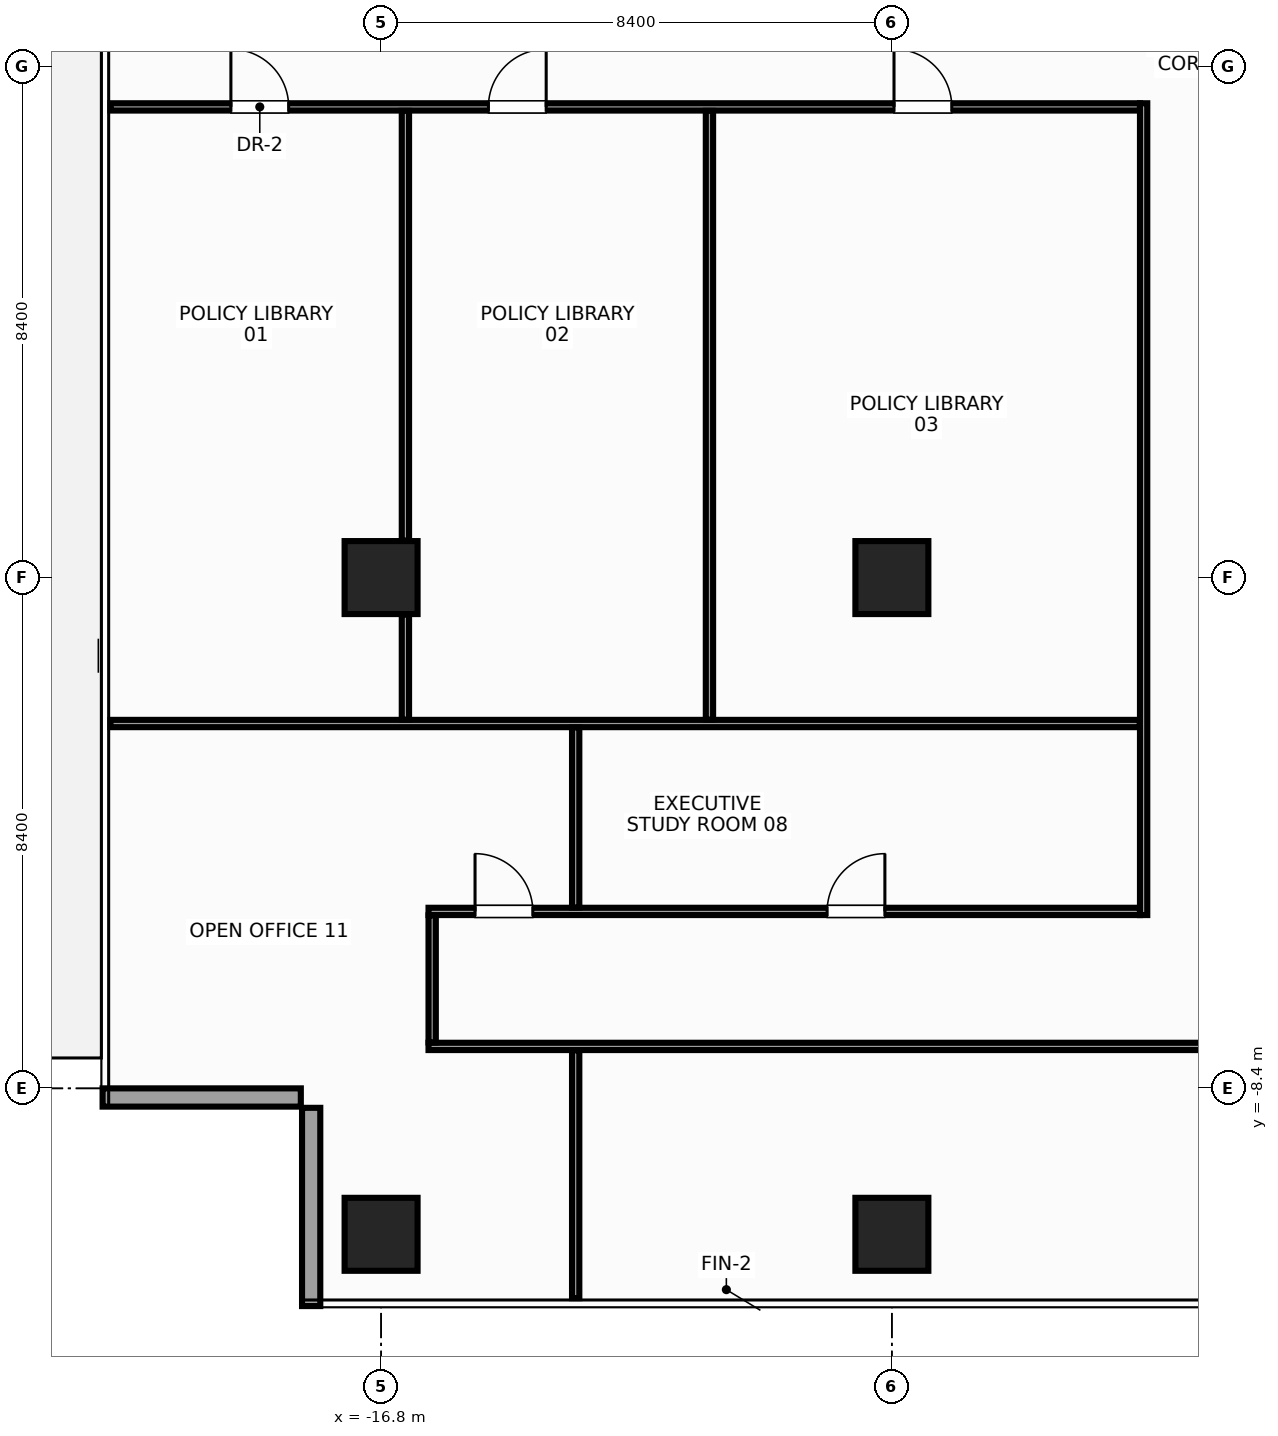
"""IFC4 building model, lengths in metres.
Left out: names, types, materials, properties, quantities, classifications, styles, units other than length and angle.
Written with IfcOpenShell. Run it as: python <this file> out.ifc"""

import sys

from ifc_helpers import new_model, si_unit, direction, frame, frame_2d, origin, origin_2d, place, context, subcontext, project, spatial, rectangle, extrude, source, transform, mapped, element, fill, save


model = new_model("IFC4")
c1 = context("Model", 3, precision=1e-05, world=origin(), true_north=direction((0.0, 1.0)))
c2 = subcontext(c1, "Body", "Model", "MODEL_VIEW")
j1 = project(units=[si_unit("LENGTHUNIT", "METRE"), si_unit("PLANEANGLEUNIT", "RADIAN")], contexts=[c1])
p1 = place(None, origin())
s1 = spatial("IfcSite", under=j1, at=p1, CompositionType="ELEMENT")
p2 = place(p1, origin())
s2 = spatial("IfcBuilding", under=s1, at=p2, CompositionType="ELEMENT")
p3 = place(p2, frame((0.0, 0.0, 272.0)))
s3 = spatial("IfcBuildingStorey", under=s2, at=p3, CompositionType="ELEMENT", Elevation=272.0)
m1 = source(origin(), c2, "Body", "SweptSolid", [
    extrude(rectangle(XDim=1.2, YDim=1.2, at=origin_2d()), origin(), (0.0, 0.0, 1.0), 3.6),
])
for number, where, z_axis, x_axis in (
    (1, (-16.8, -10.8, 0.0), (0.0, 0.0, 1.0), (1.0, 0.0, 0.0)),
    (2, (-16.8, 0.0, 0.0), (0.0, 0.0, 1.0), (1.0, 0.0, 0.0)),
    (3, (-8.4, 0.0, 0.0), (0.0, 0.0, 1.0), (1.0, 0.0, 0.0)),
    (4, (-8.4, -10.8, 0.0), (0.0, 0.0, 1.0), (1.0, 0.0, 0.0)),
):
    element("IfcColumn", number, at=place(p3, frame(where, z_axis=z_axis, x_axis=x_axis)), inside=s3, PredefinedType="COLUMN", context=c2, shape_type="MappedRepresentation", body=[
        mapped(m1, transform((0.0, 0.0, 0.0), x_axis=(1.0, 0.0, 0.0), y_axis=(0.0, 1.0, 0.0), z_axis=(0.0, 0.0, 1.0), scale=1.0)),
    ])
m2 = source(origin(), c2, "Body", "SweptSolid", [
    extrude(rectangle(XDim=3.26, YDim=0.3, at=frame_2d((1.63, 0.0))), origin(), (0.0, 0.0, 1.0), 2.75),
])
p4 = place(p3, frame((-21.38, -8.55, 0.0), z_axis=(0.0, 0.0, 1.0), x_axis=(1.0, 0.0, 0.0)))
e5 = element("IfcWall", 5, at=p4, inside=s3, PredefinedType="STANDARD", context=c2, shape_type="MappedRepresentation", body=[
    mapped(m2, transform((0.0, 0.0, 0.0), x_axis=(1.0, 0.0, 0.0), y_axis=(0.0, 1.0, 0.0), z_axis=(0.0, 0.0, 1.0), scale=1.0)),
])
m3 = source(origin(), c2, "Body", "SweptSolid", [
    extrude(rectangle(XDim=3.26, YDim=0.3, at=frame_2d((1.63, 0.0))), origin(), (0.0, 0.0, 1.0), 2.75),
])
p5 = place(p3, frame((-17.95, -8.72, 0.0), z_axis=(0.0, 0.0, 1.0), x_axis=(0.0, -1.0, 0.0)))
e6 = element("IfcWall", 6, at=p5, inside=s3, PredefinedType="STANDARD", context=c2, shape_type="MappedRepresentation", body=[
    mapped(m3, transform((0.0, 0.0, 0.0), x_axis=(1.0, 0.0, 0.0), y_axis=(0.0, 1.0, 0.0), z_axis=(0.0, 0.0, 1.0), scale=1.0)),
])
m4 = source(origin(), c2, "Body", "SweptSolid", [
    extrude(rectangle(XDim=16.93, YDim=0.12, at=frame_2d((8.465, 0.0))), origin(), (0.0, 0.0, 1.0), 2.755),
])
p6 = place(p3, frame((-21.25, 7.74, 0.0), z_axis=(0.0, 0.0, 1.0), x_axis=(1.0, 0.0, 0.0)))
e7 = element("IfcWall", 7, at=p6, inside=s3, PredefinedType="PARTITIONING", context=c2, shape_type="MappedRepresentation", body=[
    mapped(m4, transform((0.0, 0.0, 0.0), x_axis=(1.0, 0.0, 0.0), y_axis=(0.0, 1.0, 0.0), z_axis=(0.0, 0.0, 1.0), scale=1.0)),
])
p7 = place(p6, frame((1.98, 0.0, 0.0)))
e8 = element("IfcOpeningElement", 8, at=p7, cuts=e7, PredefinedType="OPENING", context=c2, shape_type="SweptSolid", body=[
    extrude(rectangle(XDim=0.95, YDim=2.15, at=frame_2d((0.475, 1.075))), frame((0.0, 0.072, 0.0), z_axis=(0.0, -1.0, 0.0), x_axis=(1.0, 0.0, 0.0)), (0.0, 0.0, 1.0), 0.144),
])
p8 = place(p6, frame((6.215, 0.0, 0.0)))
e9 = element("IfcOpeningElement", 9, at=p8, cuts=e7, PredefinedType="OPENING", context=c2, shape_type="SweptSolid", body=[
    extrude(rectangle(XDim=0.95, YDim=2.15, at=frame_2d((0.475, 1.075))), frame((0.0, 0.072, 0.0), z_axis=(0.0, -1.0, 0.0), x_axis=(1.0, 0.0, 0.0)), (0.0, 0.0, 1.0), 0.144),
])
p9 = place(p6, frame((12.885, 0.0, 0.0)))
e10 = element("IfcOpeningElement", 10, at=p9, cuts=e7, PredefinedType="OPENING", context=c2, shape_type="SweptSolid", body=[
    extrude(rectangle(XDim=0.95, YDim=2.15, at=frame_2d((0.475, 1.075))), frame((0.0, 0.072, 0.0), z_axis=(0.0, -1.0, 0.0), x_axis=(1.0, 0.0, 0.0)), (0.0, 0.0, 1.0), 0.144),
])
m5 = source(origin(), c2, "Body", "SweptSolid", [
    extrude(rectangle(XDim=11.7, YDim=0.12, at=frame_2d((5.85, 0.0))), origin(), (0.0, 0.0, 1.0), 2.755),
])
p10 = place(p3, frame((-16.02, -5.49, 0.0), z_axis=(0.0, 0.0, 1.0), x_axis=(1.0, 0.0, 0.0)))
e11 = element("IfcWall", 11, at=p10, inside=s3, PredefinedType="PARTITIONING", context=c2, shape_type="MappedRepresentation", body=[
    mapped(m5, transform((0.0, 0.0, 0.0), x_axis=(1.0, 0.0, 0.0), y_axis=(0.0, 1.0, 0.0), z_axis=(0.0, 0.0, 1.0), scale=1.0)),
])
p11 = place(p10, frame((6.555, 0.0, 0.0)))
e12 = element("IfcOpeningElement", 12, at=p11, cuts=e11, PredefinedType="OPENING", context=c2, shape_type="SweptSolid", body=[
    extrude(rectangle(XDim=0.95, YDim=2.15, at=frame_2d((0.475, 1.075))), frame((0.0, 0.072, 0.0), z_axis=(0.0, -1.0, 0.0), x_axis=(1.0, 0.0, 0.0)), (0.0, 0.0, 1.0), 0.144),
])
p12 = place(p10, frame((0.765, 0.0, 0.0)))
e13 = element("IfcOpeningElement", 13, at=p12, cuts=e11, PredefinedType="OPENING", context=c2, shape_type="SweptSolid", body=[
    extrude(rectangle(XDim=0.95, YDim=2.15, at=frame_2d((0.475, 1.075))), frame((0.0, 0.072, 0.0), z_axis=(0.0, -1.0, 0.0), x_axis=(1.0, 0.0, 0.0)), (0.0, 0.0, 1.0), 0.144),
])
m6 = source(origin(), c2, "Body", "SweptSolid", [
    extrude(rectangle(XDim=32.04, YDim=0.12, at=frame_2d((16.02, 0.0))), origin(), (0.0, 0.0, 1.0), 2.755),
])
p13 = place(p3, frame((-16.02, -7.71, 0.0), z_axis=(0.0, 0.0, 1.0), x_axis=(1.0, 0.0, 0.0)))
e14 = element("IfcWall", 14, at=p13, inside=s3, PredefinedType="PARTITIONING", context=c2, shape_type="MappedRepresentation", body=[
    mapped(m6, transform((0.0, 0.0, 0.0), x_axis=(1.0, 0.0, 0.0), y_axis=(0.0, 1.0, 0.0), z_axis=(0.0, 0.0, 1.0), scale=1.0)),
])
p14 = place(p13, frame((15.845, 0.0, 0.0)))
e15 = element("IfcOpeningElement", 15, at=p14, cuts=e14, PredefinedType="OPENING", context=c2, shape_type="SweptSolid", body=[
    extrude(rectangle(XDim=0.95, YDim=2.15, at=frame_2d((0.475, 1.075))), frame((0.0, 0.072, 0.0), z_axis=(0.0, -1.0, 0.0), x_axis=(1.0, 0.0, 0.0)), (0.0, 0.0, 1.0), 0.144),
])
m7 = source(origin(), c2, "Body", "SweptSolid", [
    extrude(rectangle(XDim=13.35, YDim=0.12, at=frame_2d((6.675, 0.0))), origin(), (0.0, 0.0, 1.0), 2.655),
])
p15 = place(p3, frame((-4.26, -5.55, 0.0), z_axis=(0.0, 0.0, 1.0), x_axis=(0.0, 1.0, 0.0)))
e16 = element("IfcWall", 16, at=p15, inside=s3, PredefinedType="PARTITIONING", context=c2, shape_type="MappedRepresentation", body=[
    mapped(m7, transform((0.0, 0.0, 0.0), x_axis=(1.0, 0.0, 0.0), y_axis=(0.0, 1.0, 0.0), z_axis=(0.0, 0.0, 1.0), scale=1.0)),
])
m8 = source(origin(), c2, "Body", "SweptSolid", [
    extrude(rectangle(XDim=2.09, YDim=0.12, at=frame_2d((1.045, 0.0))), origin(), (0.0, 0.0, 1.0), 3.37),
])
p16 = place(p3, frame((-15.96, -7.645, 0.0), z_axis=(0.0, 0.0, 1.0), x_axis=(0.0, 1.0, 0.0)))
e17 = element("IfcWall", 17, at=p16, inside=s3, PredefinedType="PARTITIONING", context=c2, shape_type="MappedRepresentation", body=[
    mapped(m8, transform((0.0, 0.0, 0.0), x_axis=(1.0, 0.0, 0.0), y_axis=(0.0, 1.0, 0.0), z_axis=(0.0, 0.0, 1.0), scale=1.0)),
])
m9 = source(origin(), c2, "Body", "SweptSolid", [
    extrude(rectangle(XDim=16.925, YDim=0.12, at=frame_2d((8.462, 0.0))), origin(), (0.0, 0.0, 1.0), 2.755),
])
p17 = place(p3, frame((-21.25, -2.4, 0.0), z_axis=(0.0, 0.0, 1.0), x_axis=(1.0, 0.0, 0.0)))
e18 = element("IfcWall", 18, at=p17, inside=s3, PredefinedType="PARTITIONING", context=c2, shape_type="MappedRepresentation", body=[
    mapped(m9, transform((0.0, 0.0, 0.0), x_axis=(1.0, 0.0, 0.0), y_axis=(0.0, 1.0, 0.0), z_axis=(0.0, 0.0, 1.0), scale=1.0)),
])
m10 = source(origin(), c2, "Body", "SweptSolid", [
    extrude(rectangle(XDim=1.725, YDim=0.12, at=frame_2d((0.862, 0.0))), origin(), (0.0, 0.0, 1.0), 3.37),
])
p18 = place(p3, frame((-16.4, -2.335, 0.0), z_axis=(0.0, 0.0, 1.0), x_axis=(0.0, 1.0, 0.0)))
e19 = element("IfcWall", 19, at=p18, inside=s3, PredefinedType="PARTITIONING", context=c2, shape_type="MappedRepresentation", body=[
    mapped(m10, transform((0.0, 0.0, 0.0), x_axis=(1.0, 0.0, 0.0), y_axis=(0.0, 1.0, 0.0), z_axis=(0.0, 0.0, 1.0), scale=1.0)),
])
m11 = source(origin(), c2, "Body", "SweptSolid", [
    extrude(rectangle(XDim=7.065, YDim=0.12, at=frame_2d((3.532, 0.0))), origin(), (0.0, 0.0, 1.0), 2.655),
])
p19 = place(p3, frame((-16.4, 0.61, 0.0), z_axis=(0.0, 0.0, 1.0), x_axis=(0.0, 1.0, 0.0)))
e20 = element("IfcWall", 20, at=p19, inside=s3, PredefinedType="PARTITIONING", context=c2, shape_type="MappedRepresentation", body=[
    mapped(m11, transform((0.0, 0.0, 0.0), x_axis=(1.0, 0.0, 0.0), y_axis=(0.0, 1.0, 0.0), z_axis=(0.0, 0.0, 1.0), scale=1.0)),
])
m12 = source(origin(), c2, "Body", "SweptSolid", [
    extrude(rectangle(XDim=10.01, YDim=0.12, at=frame_2d((5.005, 0.0))), origin(), (0.0, 0.0, 1.0), 2.655),
])
p20 = place(p3, frame((-11.4, -2.335, 0.0), z_axis=(0.0, 0.0, 1.0), x_axis=(0.0, 1.0, 0.0)))
e21 = element("IfcWall", 21, at=p20, inside=s3, PredefinedType="PARTITIONING", context=c2, shape_type="MappedRepresentation", body=[
    mapped(m12, transform((0.0, 0.0, 0.0), x_axis=(1.0, 0.0, 0.0), y_axis=(0.0, 1.0, 0.0), z_axis=(0.0, 0.0, 1.0), scale=1.0)),
])
m13 = source(origin(), c2, "Body", "SweptSolid", [
    extrude(rectangle(XDim=4.075, YDim=0.12, at=frame_2d((2.038, 0.0))), origin(), (0.0, 0.0, 1.0), 2.905),
])
p21 = place(p3, frame((-13.6, -11.85, 0.0), z_axis=(0.0, 0.0, 1.0), x_axis=(0.0, 1.0, 0.0)))
e22 = element("IfcWall", 22, at=p21, inside=s3, PredefinedType="PARTITIONING", context=c2, shape_type="MappedRepresentation", body=[
    mapped(m13, transform((0.0, 0.0, 0.0), x_axis=(1.0, 0.0, 0.0), y_axis=(0.0, 1.0, 0.0), z_axis=(0.0, 0.0, 1.0), scale=1.0)),
])
m14 = source(origin(), c2, "Body", "SweptSolid", [
    extrude(rectangle(XDim=2.96, YDim=0.12, at=frame_2d((1.48, 0.0))), origin(), (0.0, 0.0, 1.0), 3.37),
])
p22 = place(p3, frame((-13.6, -5.425, 0.0), z_axis=(0.0, 0.0, 1.0), x_axis=(0.0, 1.0, 0.0)))
e23 = element("IfcWall", 23, at=p22, inside=s3, PredefinedType="PARTITIONING", context=c2, shape_type="MappedRepresentation", body=[
    mapped(m14, transform((0.0, 0.0, 0.0), x_axis=(1.0, 0.0, 0.0), y_axis=(0.0, 1.0, 0.0), z_axis=(0.0, 0.0, 1.0), scale=1.0)),
])
m15 = source(origin(), c2, "Body", "SweptSolid", [
    extrude(rectangle(XDim=0.95, YDim=2.15, at=frame_2d((0.475, 1.075))), frame((0.0, 0.025, 0.0), z_axis=(0.0, -1.0, 0.0), x_axis=(1.0, 0.0, 0.0)), (0.0, 0.0, 1.0), 0.05),
])
p23 = place(p7, origin())
e24 = element("IfcDoor", 24, at=p23, inside=s3, OperationType="SINGLE_SWING_LEFT", PredefinedType="DOOR", context=c2, shape_type="MappedRepresentation", body=[
    mapped(m15, transform((0.0, 0.0, 0.0), x_axis=(1.0, 0.0, 0.0), y_axis=(0.0, 1.0, 0.0), z_axis=(0.0, 0.0, 1.0), scale=1.0)),
])
fill(e8, e24)
p24 = place(p8, origin())
e25 = element("IfcDoor", 25, at=p24, inside=s3, OperationType="SINGLE_SWING_RIGHT", PredefinedType="DOOR", context=c2, shape_type="MappedRepresentation", body=[
    mapped(m15, transform((0.0, 0.0, 0.0), x_axis=(1.0, 0.0, 0.0), y_axis=(0.0, 1.0, 0.0), z_axis=(0.0, 0.0, 1.0), scale=1.0)),
])
fill(e9, e25)
p25 = place(p9, origin())
e26 = element("IfcDoor", 26, at=p25, inside=s3, OperationType="SINGLE_SWING_LEFT", PredefinedType="DOOR", context=c2, shape_type="MappedRepresentation", body=[
    mapped(m15, transform((0.0, 0.0, 0.0), x_axis=(1.0, 0.0, 0.0), y_axis=(0.0, 1.0, 0.0), z_axis=(0.0, 0.0, 1.0), scale=1.0)),
])
fill(e10, e26)
p26 = place(p11, origin())
e27 = element("IfcDoor", 27, at=p26, inside=s3, OperationType="SINGLE_SWING_RIGHT", PredefinedType="DOOR", context=c2, shape_type="MappedRepresentation", body=[
    mapped(m15, transform((0.0, 0.0, 0.0), x_axis=(1.0, 0.0, 0.0), y_axis=(0.0, 1.0, 0.0), z_axis=(0.0, 0.0, 1.0), scale=1.0)),
])
fill(e12, e27)
p27 = place(p12, origin())
e28 = element("IfcDoor", 28, at=p27, inside=s3, OperationType="SINGLE_SWING_LEFT", PredefinedType="DOOR", context=c2, shape_type="MappedRepresentation", body=[
    mapped(m15, transform((0.0, 0.0, 0.0), x_axis=(1.0, 0.0, 0.0), y_axis=(0.0, 1.0, 0.0), z_axis=(0.0, 0.0, 1.0), scale=1.0)),
])
fill(e13, e28)
save(model, sys.argv[1])
